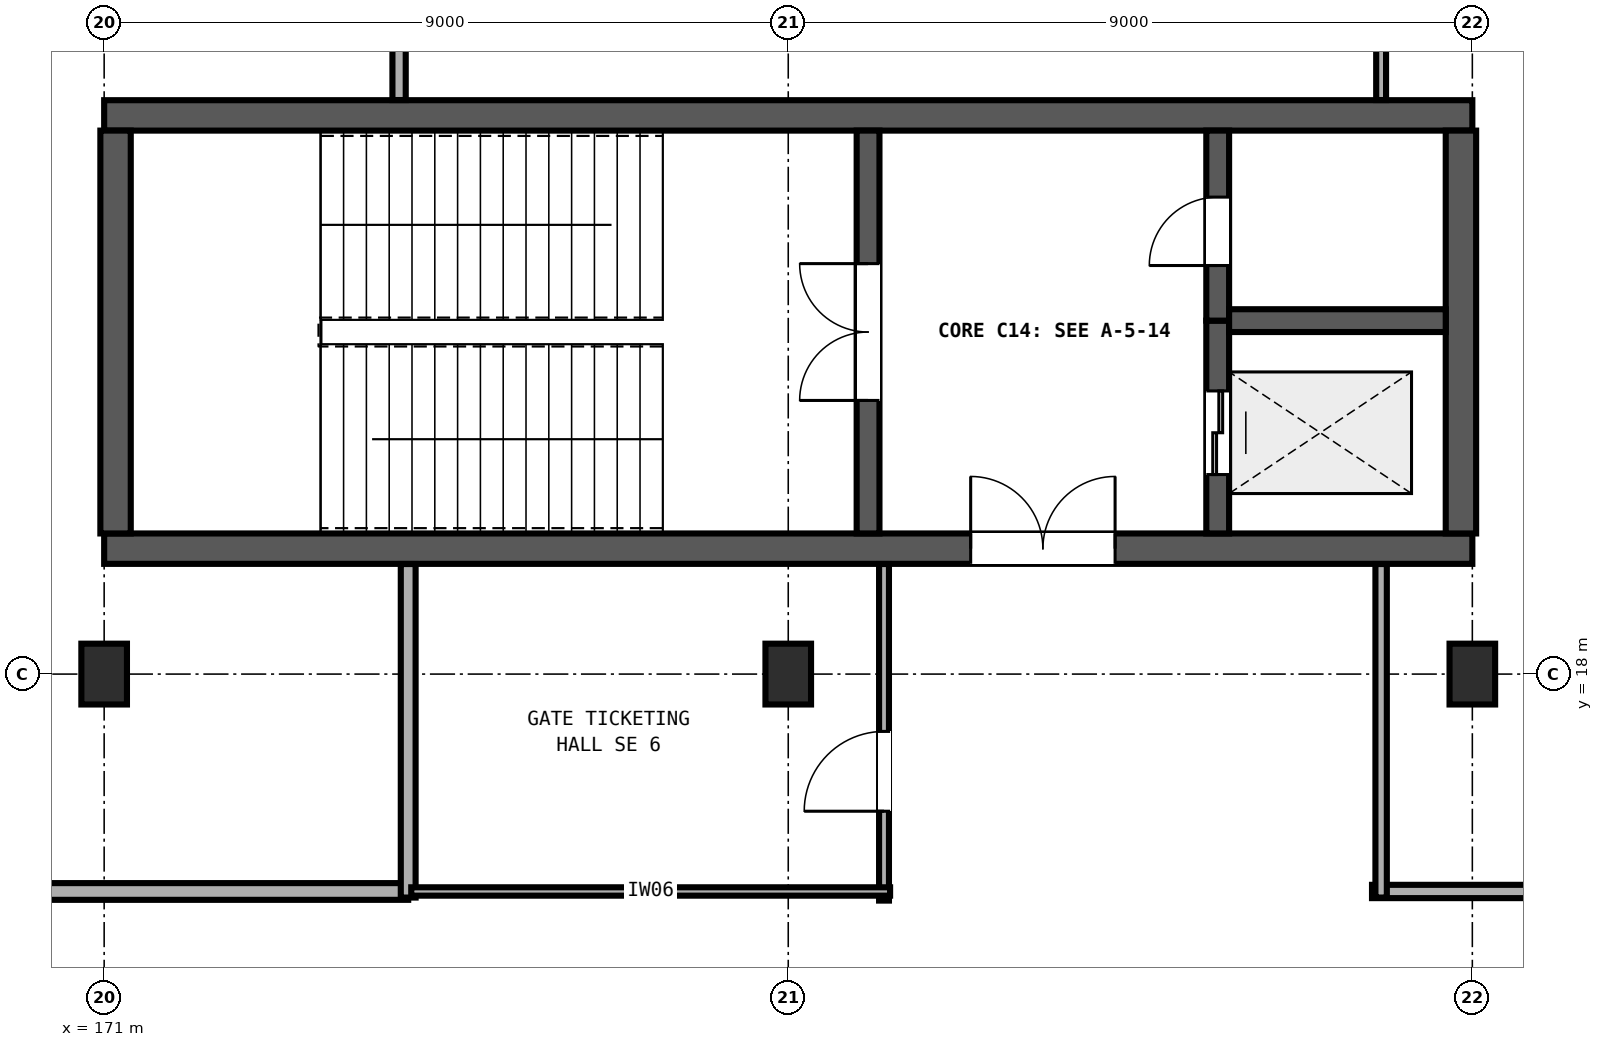
"""IFC4 building model, lengths in metres.
Left out: names, types, materials, properties, quantities, classifications, styles, units other than length and angle.
Written with IfcOpenShell. Run it as: python <this file> out.ifc"""

import sys

from ifc_helpers import new_model, si_unit, direction, frame, frame_2d, origin, origin_2d, place, context, subcontext, project, spatial, rectangle, extrude, element, fill, save


model = new_model("IFC4")
c1 = context("Model", 3, precision=1e-05, world=origin(), true_north=direction((0.0, 1.0)))
c2 = subcontext(c1, "Body", "Model", "MODEL_VIEW")
j1 = project(units=[si_unit("LENGTHUNIT", "METRE"), si_unit("PLANEANGLEUNIT", "RADIAN")], contexts=[c1])
p1 = place(None, origin())
s1 = spatial("IfcSite", under=j1, at=p1, CompositionType="ELEMENT")
p2 = place(p1, origin())
s2 = spatial("IfcBuilding", under=s1, at=p2, CompositionType="ELEMENT")
p3 = place(p2, origin())
s3 = spatial("IfcBuildingStorey", under=s2, at=p3, CompositionType="ELEMENT", Elevation=0.0)
for number, where, z_axis, x_axis in (
    (1, (171.0, 18.0, 0.0), (0.0, 0.0, 1.0), (1.0, 0.0, 0.0)),
    (2, (180.0, 18.0, 0.0), (0.0, 0.0, 1.0), (1.0, 0.0, 0.0)),
    (3, (189.0, 18.0, 0.0), (0.0, 0.0, 1.0), (1.0, 0.0, 0.0)),
):
    element("IfcColumn", number, at=place(p3, frame(where, z_axis=z_axis, x_axis=x_axis)), inside=s3, PredefinedType="COLUMN", context=c2, shape_type="SweptSolid", body=[
        extrude(rectangle(XDim=0.6, YDim=0.8, at=origin_2d()), origin(), (0.0, 0.0, 1.0), 4.8),
    ])
p4 = place(p3, frame((171.0, 19.65, 0.0), z_axis=(0.0, 0.0, 1.0), x_axis=(1.0, 0.0, 0.0)))
e4 = element("IfcWall", 4, at=p4, inside=s3, PredefinedType="SHEAR", context=c2, shape_type="SweptSolid", body=[
    extrude(rectangle(XDim=18.0, YDim=0.4, at=frame_2d((9.0, 0.0))), origin(), (0.0, 0.0, 1.0), 4.5),
])
p5 = place(p4, frame((11.4, 0.0, 0.0)))
e5 = element("IfcOpeningElement", 5, at=p5, cuts=e4, PredefinedType="OPENING", context=c2, shape_type="SweptSolid", body=[
    extrude(rectangle(XDim=1.9, YDim=2.25, at=frame_2d((0.95, 1.125))), frame((0.0, 0.21, 0.0), z_axis=(0.0, -1.0, 0.0), x_axis=(1.0, 0.0, 0.0)), (0.0, 0.0, 1.0), 0.42),
])
p6 = place(p3, frame((189.0, 25.35, 0.0), z_axis=(0.0, 0.0, 1.0), x_axis=(-1.0, 0.0, 0.0)))
e6 = element("IfcWall", 6, at=p6, inside=s3, PredefinedType="SHEAR", context=c2, shape_type="SweptSolid", body=[
    extrude(rectangle(XDim=18.0, YDim=0.4, at=frame_2d((9.0, 0.0))), origin(), (0.0, 0.0, 1.0), 4.5),
])
for number, where, z_axis, x_axis in (
    (7, (171.15, 25.15, 0.0), (0.0, 0.0, 1.0), (0.0, -1.0, 0.0)),
    (8, (188.85, 19.85, 0.0), (0.0, 0.0, 1.0), (0.0, 1.0, 0.0)),
):
    element("IfcWall", number, at=place(p3, frame(where, z_axis=z_axis, x_axis=x_axis)), inside=s3, PredefinedType="SHEAR", context=c2, shape_type="SweptSolid", body=[
        extrude(rectangle(XDim=5.3, YDim=0.4, at=frame_2d((2.65, 0.0))), origin(), (0.0, 0.0, 1.0), 4.5),
    ])
p7 = place(p3, frame((181.05, 19.85, 0.0), z_axis=(0.0, 0.0, 1.0), x_axis=(0.0, 1.0, 0.0)))
e9 = element("IfcWall", 9, at=p7, inside=s3, PredefinedType="SHEAR", context=c2, shape_type="SweptSolid", body=[
    extrude(rectangle(XDim=5.3, YDim=0.3, at=frame_2d((2.65, 0.0))), origin(), (0.0, 0.0, 1.0), 4.5),
])
p8 = place(p7, frame((1.75, 0.0, 0.0)))
e10 = element("IfcOpeningElement", 10, at=p8, cuts=e9, PredefinedType="OPENING", context=c2, shape_type="SweptSolid", body=[
    extrude(rectangle(XDim=1.8, YDim=2.25, at=frame_2d((0.9, 1.125))), frame((0.0, 0.16, 0.0), z_axis=(0.0, -1.0, 0.0), x_axis=(1.0, 0.0, 0.0)), (0.0, 0.0, 1.0), 0.32),
])
p9 = place(p3, frame((185.65, 19.85, 0.0), z_axis=(0.0, 0.0, 1.0), x_axis=(0.0, 1.0, 0.0)))
e11 = element("IfcWall", 11, at=p9, inside=s3, PredefinedType="SHEAR", context=c2, shape_type="SweptSolid", body=[
    extrude(rectangle(XDim=2.8, YDim=0.3, at=frame_2d((1.4, 0.0))), origin(), (0.0, 0.0, 1.0), 4.5),
])
p10 = place(p9, frame((0.775, 0.0, 0.0)))
e12 = element("IfcOpeningElement", 12, at=p10, cuts=e11, PredefinedType="OPENING", context=c2, shape_type="SweptSolid", body=[
    extrude(rectangle(XDim=1.1, YDim=2.1, at=frame_2d((0.55, 1.05))), frame((0.0, 0.16, 0.0), z_axis=(0.0, -1.0, 0.0), x_axis=(1.0, 0.0, 0.0)), (0.0, 0.0, 1.0), 0.32),
])
p11 = place(p3, frame((185.65, 22.65, 0.0), z_axis=(0.0, 0.0, 1.0), x_axis=(0.0, 1.0, 0.0)))
e13 = element("IfcWall", 13, at=p11, inside=s3, PredefinedType="SHEAR", context=c2, shape_type="SweptSolid", body=[
    extrude(rectangle(XDim=2.5, YDim=0.3, at=frame_2d((1.25, 0.0))), origin(), (0.0, 0.0, 1.0), 4.5),
])
p12 = place(p11, frame((0.725, 0.0, 0.0)))
e14 = element("IfcOpeningElement", 14, at=p12, cuts=e13, PredefinedType="OPENING", context=c2, shape_type="SweptSolid", body=[
    extrude(rectangle(XDim=0.9, YDim=2.1, at=frame_2d((0.45, 1.05))), frame((0.0, 0.16, 0.0), z_axis=(0.0, -1.0, 0.0), x_axis=(1.0, 0.0, 0.0)), (0.0, 0.0, 1.0), 0.32),
])
p13 = place(p3, frame((185.8, 22.65, 0.0), z_axis=(0.0, 0.0, 1.0), x_axis=(1.0, 0.0, 0.0)))
e15 = element("IfcWall", 15, at=p13, inside=s3, PredefinedType="SHEAR", context=c2, shape_type="SweptSolid", body=[
    extrude(rectangle(XDim=2.85, YDim=0.3, at=frame_2d((1.425, 0.0))), origin(), (0.0, 0.0, 1.0), 4.5),
])
p14 = place(p3, frame((187.68, 15.14, 0.0), z_axis=(0.0, 0.0, 1.0), x_axis=(1.0, 0.0, 0.0)))
e16 = element("IfcWall", 16, at=p14, inside=s3, PredefinedType="PARTITIONING", context=c2, shape_type="SweptSolid", body=[
    extrude(rectangle(XDim=12.8, YDim=0.175, at=frame_2d((6.4, 0.0))), origin(), (0.0, 0.0, 1.0), 3.28),
])
p15 = place(p14, frame((5.55, 0.0, 0.0)))
e17 = element("IfcOpeningElement", 17, at=p15, cuts=e16, PredefinedType="OPENING", context=c2, shape_type="SweptSolid", body=[
    extrude(rectangle(XDim=1.7, YDim=2.2, at=frame_2d((0.85, 1.1))), frame((0.0, 0.097, 0.0), z_axis=(0.0, -1.0, 0.0), x_axis=(1.0, 0.0, 0.0)), (0.0, 0.0, 1.0), 0.195),
])
p16 = place(p3, frame((187.8, 15.06, 0.0), z_axis=(0.0, 0.0, 1.0), x_axis=(0.0, 1.0, 0.0)))
e18 = element("IfcWall", 18, at=p16, inside=s3, PredefinedType="PARTITIONING", context=c2, shape_type="SweptSolid", body=[
    extrude(rectangle(XDim=4.388, YDim=0.15, at=frame_2d((2.194, 0.0))), origin(), (0.0, 0.0, 1.0), 3.28),
])
p17 = place(p3, frame((187.8, 25.552, 0.0), z_axis=(0.0, 0.0, 1.0), x_axis=(0.0, 1.0, 0.0)))
e19 = element("IfcWall", 19, at=p17, inside=s3, PredefinedType="PARTITIONING", context=c2, shape_type="SweptSolid", body=[
    extrude(rectangle(XDim=10.208, YDim=0.13, at=frame_2d((5.104, 0.0))), origin(), (0.0, 0.0, 1.0), 3.28),
])
p18 = place(p3, frame((162.2, 15.14, 0.0), z_axis=(0.0, 0.0, 1.0), x_axis=(1.0, 0.0, 0.0)))
e20 = element("IfcWall", 20, at=p18, inside=s3, PredefinedType="PARTITIONING", context=c2, shape_type="SweptSolid", body=[
    extrude(rectangle(XDim=12.8, YDim=0.22, at=frame_2d((6.4, 0.0))), origin(), (0.0, 0.0, 1.0), 3.28),
])
p19 = place(p18, frame((5.625, 0.0, 0.0)))
e21 = element("IfcOpeningElement", 21, at=p19, cuts=e20, PredefinedType="OPENING", context=c2, shape_type="SweptSolid", body=[
    extrude(rectangle(XDim=1.55, YDim=2.2, at=frame_2d((0.775, 1.1))), frame((0.0, 0.12, 0.0), z_axis=(0.0, -1.0, 0.0), x_axis=(1.0, 0.0, 0.0)), (0.0, 0.0, 1.0), 0.24),
])
p20 = place(p3, frame((175.0, 19.448, 0.0), z_axis=(0.0, 0.0, 1.0), x_axis=(0.0, -1.0, 0.0)))
e22 = element("IfcWall", 22, at=p20, inside=s3, PredefinedType="PARTITIONING", context=c2, shape_type="SweptSolid", body=[
    extrude(rectangle(XDim=4.388, YDim=0.195, at=frame_2d((2.194, 0.0))), origin(), (0.0, 0.0, 1.0), 3.28),
])
p21 = place(p3, frame((174.88, 35.76, 0.0), z_axis=(0.0, 0.0, 1.0), x_axis=(0.0, -1.0, 0.0)))
e23 = element("IfcWall", 23, at=p21, inside=s3, PredefinedType="PARTITIONING", context=c2, shape_type="SweptSolid", body=[
    extrude(rectangle(XDim=10.208, YDim=0.175, at=frame_2d((5.104, 0.0))), origin(), (0.0, 0.0, 1.0), 3.28),
])
p22 = place(p3, frame((181.26, 15.02, 0.0), z_axis=(0.0, 0.0, 1.0), x_axis=(0.0, 1.0, 0.0)))
e24 = element("IfcWall", 24, at=p22, inside=s3, PredefinedType="PARTITIONING", context=c2, shape_type="SweptSolid", body=[
    extrude(rectangle(XDim=4.428, YDim=0.13, at=frame_2d((2.214, 0.0))), origin(), (0.0, 0.0, 1.0), 3.28),
])
p23 = place(p22, frame((1.176, 0.0, 0.0)))
e25 = element("IfcOpeningElement", 25, at=p23, cuts=e24, PredefinedType="OPENING", context=c2, shape_type="SweptSolid", body=[
    extrude(rectangle(XDim=1.05, YDim=2.1, at=frame_2d((0.525, 1.05))), frame((0.0, 0.075, 0.0), z_axis=(0.0, -1.0, 0.0), x_axis=(1.0, 0.0, 0.0)), (0.0, 0.0, 1.0), 0.15),
])
p24 = place(p3, frame((181.34, 15.14, 0.0), z_axis=(0.0, 0.0, 1.0), x_axis=(-1.0, 0.0, 0.0)))
e26 = element("IfcWall", 26, at=p24, inside=s3, PredefinedType="PARTITIONING", context=c2, shape_type="SweptSolid", body=[
    extrude(rectangle(XDim=6.3, YDim=0.11, at=frame_2d((3.15, 0.0))), origin(), (0.0, 0.0, 1.0), 3.28),
])
p25 = place(p8, origin())
e27 = element("IfcDoor", 27, at=p25, inside=s3, OperationType="DOUBLE_DOOR_SINGLE_SWING", PredefinedType="DOOR", context=c2, shape_type="SweptSolid", body=[
    extrude(rectangle(XDim=1.8, YDim=2.25, at=frame_2d((0.9, 1.125))), frame((0.0, 0.025, 0.0), z_axis=(0.0, -1.0, 0.0), x_axis=(1.0, 0.0, 0.0)), (0.0, 0.0, 1.0), 0.05),
])
fill(e10, e27)
p26 = place(p12, origin())
e28 = element("IfcDoor", 28, at=p26, inside=s3, OperationType="SINGLE_SWING_LEFT", PredefinedType="DOOR", context=c2, shape_type="SweptSolid", body=[
    extrude(rectangle(XDim=0.9, YDim=2.1, at=frame_2d((0.45, 1.05))), frame((0.0, 0.025, 0.0), z_axis=(0.0, -1.0, 0.0), x_axis=(1.0, 0.0, 0.0)), (0.0, 0.0, 1.0), 0.05),
])
fill(e14, e28)
p27 = place(p10, origin())
e29 = element("IfcDoor", 29, at=p27, inside=s3, OperationType="DOUBLE_DOOR_SLIDING", PredefinedType="DOOR", context=c2, shape_type="SweptSolid", body=[
    extrude(rectangle(XDim=1.1, YDim=2.1, at=frame_2d((0.55, 1.05))), frame((0.0, 0.025, 0.0), z_axis=(0.0, -1.0, 0.0), x_axis=(1.0, 0.0, 0.0)), (0.0, 0.0, 1.0), 0.05),
])
fill(e12, e29)
p28 = place(p5, origin())
e30 = element("IfcDoor", 30, at=p28, inside=s3, OperationType="DOUBLE_DOOR_SINGLE_SWING", PredefinedType="DOOR", context=c2, shape_type="SweptSolid", body=[
    extrude(rectangle(XDim=1.9, YDim=2.25, at=frame_2d((0.95, 1.125))), frame((0.0, 0.025, 0.0), z_axis=(0.0, -1.0, 0.0), x_axis=(1.0, 0.0, 0.0)), (0.0, 0.0, 1.0), 0.05),
])
fill(e5, e30)
p29 = place(p23, origin())
e31 = element("IfcDoor", 31, at=p29, inside=s3, OperationType="SINGLE_SWING_LEFT", PredefinedType="DOOR", context=c2, shape_type="SweptSolid", body=[
    extrude(rectangle(XDim=1.05, YDim=2.1, at=frame_2d((0.525, 1.05))), frame((0.0, 0.025, 0.0), z_axis=(0.0, -1.0, 0.0), x_axis=(1.0, 0.0, 0.0)), (0.0, 0.0, 1.0), 0.05),
])
fill(e25, e31)
save(model, sys.argv[1])
